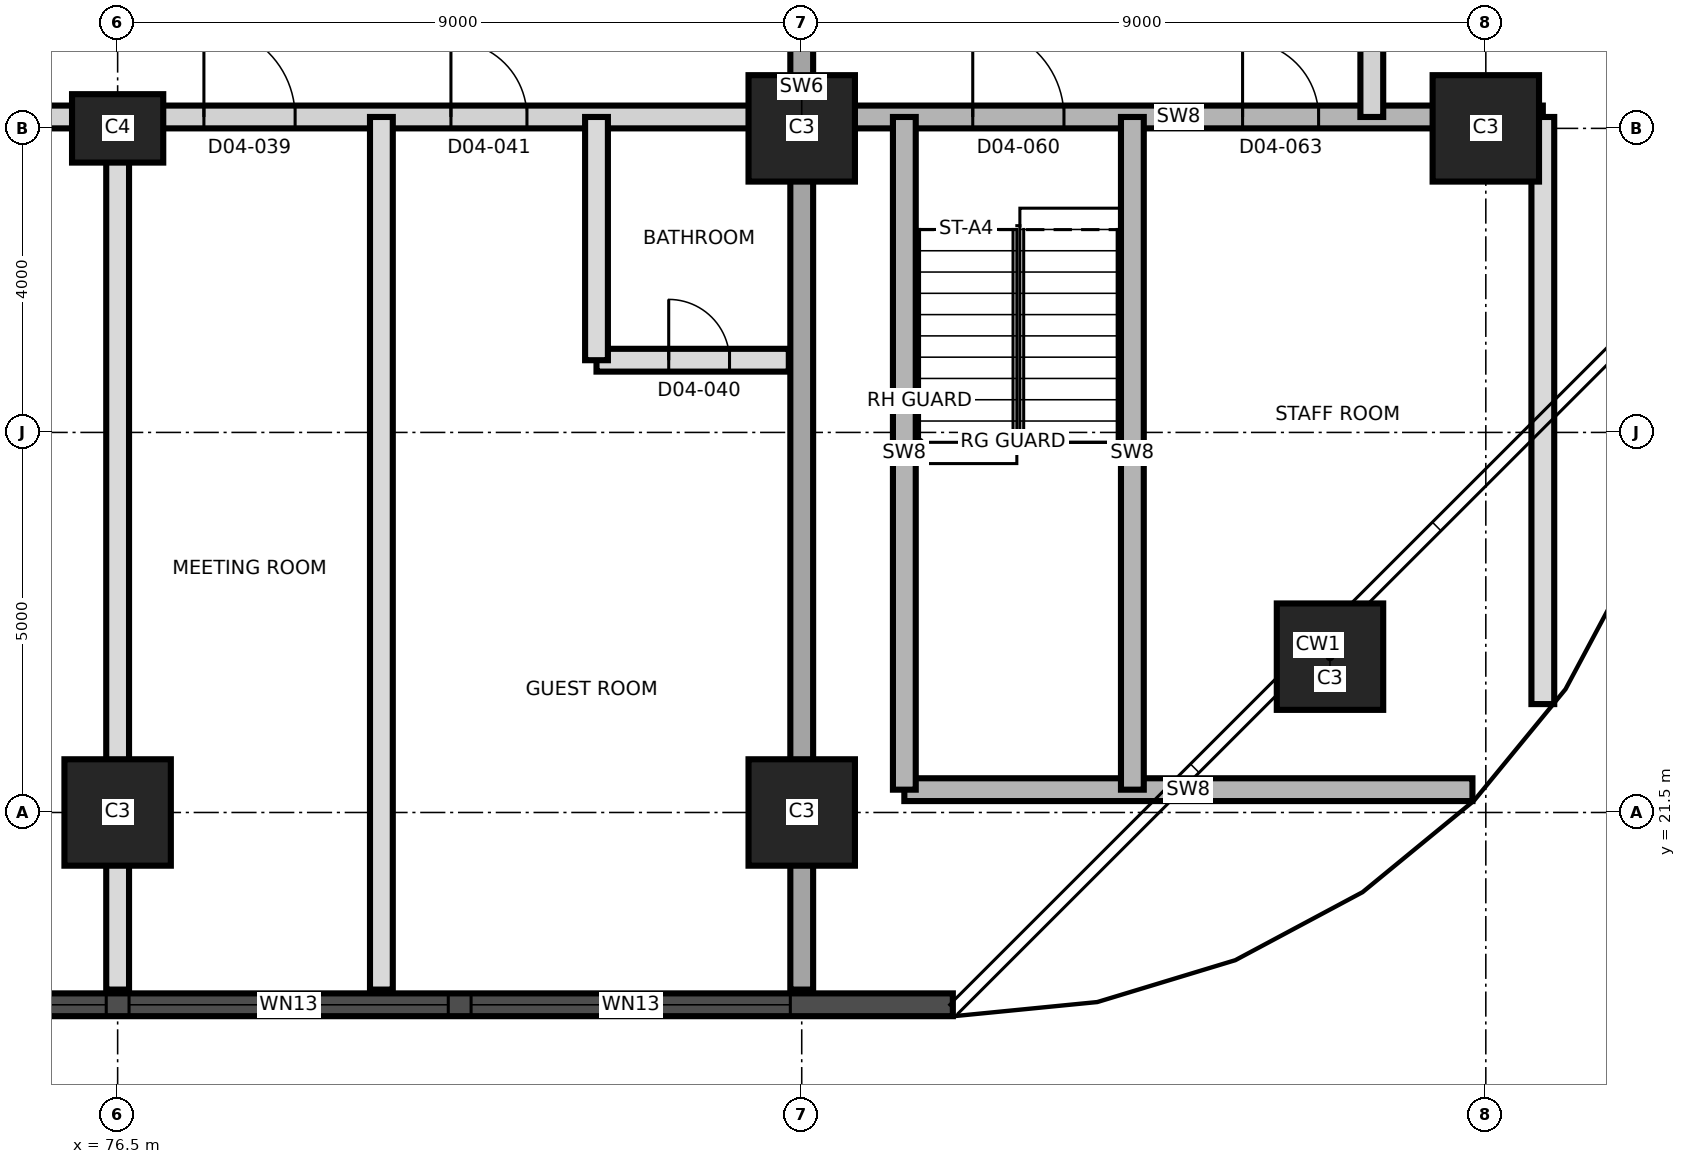
"""IFC4 building model, lengths in metres.
Left out: names, types, materials, properties, quantities, classifications, styles, units other than length and angle.
Written with IfcOpenShell. Run it as: python <this file> out.ifc"""

import sys

from ifc_helpers import new_model, si_unit, direction, frame, frame_2d, origin, origin_2d, place, context, subcontext, project, spatial, rectangle, extrude, element, fill, save


model = new_model("IFC4")
c1 = context("Model", 3, precision=1e-05, world=origin(), true_north=direction((0.0, 1.0)))
c2 = subcontext(c1, "Body", "Model", "MODEL_VIEW")
j1 = project(units=[si_unit("LENGTHUNIT", "METRE"), si_unit("PLANEANGLEUNIT", "RADIAN")], contexts=[c1])
p1 = place(None, origin())
s1 = spatial("IfcSite", under=j1, at=p1, CompositionType="ELEMENT")
p2 = place(p1, origin())
s2 = spatial("IfcBuilding", under=s1, at=p2, CompositionType="ELEMENT")
p3 = place(p2, frame((0.0, 0.0, 66.8)))
s3 = spatial("IfcBuildingStorey", under=s2, at=p3, CompositionType="ELEMENT", Elevation=66.8)
for number, where, z_axis, x_axis in (
    (1, (76.5, 21.5, 0.0), (0.0, 0.0, 1.0), (1.0, 0.0, 0.0)),
    (2, (85.5, 21.5, 0.0), (0.0, 0.0, 1.0), (1.0, 0.0, 0.0)),
    (3, (92.45, 23.55, 0.0), (0.0, 0.0, 1.0), (1.0, 0.0, 0.0)),
):
    element("IfcColumn", number, at=place(p3, frame(where, z_axis=z_axis, x_axis=x_axis)), inside=s3, PredefinedType="COLUMN", context=c2, shape_type="SweptSolid", body=[
        extrude(rectangle(XDim=1.4, YDim=1.4, at=origin_2d()), origin(), (0.0, 0.0, 1.0), 3.7),
    ])
p4 = place(p3, frame((76.5, 30.5, 0.0), z_axis=(0.0, 0.0, 1.0), x_axis=(1.0, 0.0, 0.0)))
e4 = element("IfcColumn", 4, at=p4, inside=s3, PredefinedType="COLUMN", context=c2, shape_type="SweptSolid", body=[
    extrude(rectangle(XDim=1.2, YDim=0.9, at=origin_2d()), origin(), (0.0, 0.0, 1.0), 3.7),
])
for number, where, z_axis, x_axis in (
    (5, (85.5, 30.5, 0.0), (0.0, 0.0, 1.0), (1.0, 0.0, 0.0)),
    (6, (94.5, 30.5, 0.0), (0.0, 0.0, 1.0), (1.0, 0.0, 0.0)),
):
    element("IfcColumn", number, at=place(p3, frame(where, z_axis=z_axis, x_axis=x_axis)), inside=s3, PredefinedType="COLUMN", context=c2, shape_type="SweptSolid", body=[
        extrude(rectangle(XDim=1.4, YDim=1.4, at=origin_2d()), origin(), (0.0, 0.0, 1.0), 3.7),
    ])
p5 = place(p3, frame((85.5, 19.17, 0.0), z_axis=(0.0, 0.0, 1.0), x_axis=(0.0, 1.0, 0.0)))
e7 = element("IfcWall", 7, at=p5, inside=s3, PredefinedType="SHEAR", context=c2, shape_type="SweptSolid", body=[
    extrude(rectangle(XDim=22.66, YDim=0.3, at=frame_2d((11.33, 0.0))), origin(), (0.0, 0.0, 1.0), 3.7),
])
p6 = place(p5, frame((12.53, 0.0, 0.0)))
e8 = element("IfcOpeningElement", 8, at=p6, cuts=e7, PredefinedType="OPENING", context=c2, shape_type="SweptSolid", body=[
    extrude(rectangle(XDim=1.4, YDim=2.1, at=frame_2d((0.7, 1.05))), frame((0.0, 0.16, 0.0), z_axis=(0.0, -1.0, 0.0), x_axis=(1.0, 0.0, 0.0)), (0.0, 0.0, 1.0), 0.32),
])
p7 = place(p3, frame((44.01, 18.97, 0.0), z_axis=(0.0, 0.0, 1.0), x_axis=(1.0, 0.0, 0.0)))
e9 = element("IfcWall", 9, at=p7, inside=s3, PredefinedType="SOLIDWALL", context=c2, shape_type="SweptSolid", body=[
    extrude(rectangle(XDim=43.478, YDim=0.3, at=frame_2d((21.739, 0.0))), origin(), (0.0, 0.0, 1.0), 3.4),
])
p8 = place(p7, frame((1.845, 0.0, 0.3)))
e10 = element("IfcOpeningElement", 10, at=p8, cuts=e9, PredefinedType="OPENING", context=c2, shape_type="SweptSolid", body=[
    extrude(rectangle(XDim=1.8, YDim=2.4, at=frame_2d((0.9, 1.2))), frame((0.0, 0.16, 0.0), z_axis=(0.0, -1.0, 0.0), x_axis=(1.0, 0.0, 0.0)), (0.0, 0.0, 1.0), 0.32),
])
p9 = place(p7, frame((5.64, 0.0, 0.9)))
e11 = element("IfcOpeningElement", 11, at=p9, cuts=e9, PredefinedType="OPENING", context=c2, shape_type="SweptSolid", body=[
    extrude(rectangle(XDim=4.2, YDim=1.7, at=frame_2d((2.1, 0.85))), frame((0.0, 0.16, 0.0), z_axis=(0.0, -1.0, 0.0), x_axis=(1.0, 0.0, 0.0)), (0.0, 0.0, 1.0), 0.32),
])
p10 = place(p7, frame((10.14, 0.0, 0.9)))
e12 = element("IfcOpeningElement", 12, at=p10, cuts=e9, PredefinedType="OPENING", context=c2, shape_type="SweptSolid", body=[
    extrude(rectangle(XDim=4.2, YDim=1.7, at=frame_2d((2.1, 0.85))), frame((0.0, 0.16, 0.0), z_axis=(0.0, -1.0, 0.0), x_axis=(1.0, 0.0, 0.0)), (0.0, 0.0, 1.0), 0.32),
])
p11 = place(p7, frame((14.64, 0.0, 0.9)))
e13 = element("IfcOpeningElement", 13, at=p11, cuts=e9, PredefinedType="OPENING", context=c2, shape_type="SweptSolid", body=[
    extrude(rectangle(XDim=4.2, YDim=1.7, at=frame_2d((2.1, 0.85))), frame((0.0, 0.16, 0.0), z_axis=(0.0, -1.0, 0.0), x_axis=(1.0, 0.0, 0.0)), (0.0, 0.0, 1.0), 0.32),
])
p12 = place(p7, frame((19.14, 0.0, 0.9)))
e14 = element("IfcOpeningElement", 14, at=p12, cuts=e9, PredefinedType="OPENING", context=c2, shape_type="SweptSolid", body=[
    extrude(rectangle(XDim=4.2, YDim=1.7, at=frame_2d((2.1, 0.85))), frame((0.0, 0.16, 0.0), z_axis=(0.0, -1.0, 0.0), x_axis=(1.0, 0.0, 0.0)), (0.0, 0.0, 1.0), 0.32),
])
p13 = place(p7, frame((23.64, 0.0, 0.9)))
e15 = element("IfcOpeningElement", 15, at=p13, cuts=e9, PredefinedType="OPENING", context=c2, shape_type="SweptSolid", body=[
    extrude(rectangle(XDim=4.2, YDim=1.7, at=frame_2d((2.1, 0.85))), frame((0.0, 0.16, 0.0), z_axis=(0.0, -1.0, 0.0), x_axis=(1.0, 0.0, 0.0)), (0.0, 0.0, 1.0), 0.32),
])
p14 = place(p7, frame((28.14, 0.0, 0.9)))
e16 = element("IfcOpeningElement", 16, at=p14, cuts=e9, PredefinedType="OPENING", context=c2, shape_type="SweptSolid", body=[
    extrude(rectangle(XDim=4.2, YDim=1.7, at=frame_2d((2.1, 0.85))), frame((0.0, 0.16, 0.0), z_axis=(0.0, -1.0, 0.0), x_axis=(1.0, 0.0, 0.0)), (0.0, 0.0, 1.0), 0.32),
])
p15 = place(p7, frame((32.64, 0.0, 0.9)))
e17 = element("IfcOpeningElement", 17, at=p15, cuts=e9, PredefinedType="OPENING", context=c2, shape_type="SweptSolid", body=[
    extrude(rectangle(XDim=4.2, YDim=1.7, at=frame_2d((2.1, 0.85))), frame((0.0, 0.16, 0.0), z_axis=(0.0, -1.0, 0.0), x_axis=(1.0, 0.0, 0.0)), (0.0, 0.0, 1.0), 0.32),
])
p16 = place(p7, frame((37.14, 0.0, 0.9)))
e18 = element("IfcOpeningElement", 18, at=p16, cuts=e9, PredefinedType="OPENING", context=c2, shape_type="SweptSolid", body=[
    extrude(rectangle(XDim=4.2, YDim=1.7, at=frame_2d((2.1, 0.85))), frame((0.0, 0.16, 0.0), z_axis=(0.0, -1.0, 0.0), x_axis=(1.0, 0.0, 0.0)), (0.0, 0.0, 1.0), 0.32),
])
p17 = place(p3, frame((86.85, 21.8, 0.0), z_axis=(0.0, 0.0, 1.0), x_axis=(1.0, 0.0, 0.0)))
e19 = element("IfcWall", 19, at=p17, inside=s3, PredefinedType="SHEAR", context=c2, shape_type="SweptSolid", body=[
    extrude(rectangle(XDim=7.474, YDim=0.3, at=frame_2d((3.737, 0.0))), origin(), (0.0, 0.0, 1.0), 3.4),
])
p18 = place(p3, frame((82.8, 27.45, 0.0), z_axis=(0.0, 0.0, 1.0), x_axis=(1.0, 0.0, 0.0)))
e20 = element("IfcWall", 20, at=p18, inside=s3, PredefinedType="PARTITIONING", context=c2, shape_type="SweptSolid", body=[
    extrude(rectangle(XDim=2.53, YDim=0.3, at=frame_2d((1.265, 0.0))), origin(), (0.0, 0.0, 1.0), 3.4),
])
p19 = place(p18, frame((0.95, 0.0, 0.0)))
e21 = element("IfcOpeningElement", 21, at=p19, cuts=e20, PredefinedType="OPENING", context=c2, shape_type="SweptSolid", body=[
    extrude(rectangle(XDim=0.8, YDim=2.1, at=frame_2d((0.4, 1.05))), frame((0.0, 0.16, 0.0), z_axis=(0.0, -1.0, 0.0), x_axis=(1.0, 0.0, 0.0)), (0.0, 0.0, 1.0), 0.32),
])
p20 = place(p3, frame((58.95, 30.65, 0.0), z_axis=(0.0, 0.0, 1.0), x_axis=(1.0, 0.0, 0.0)))
e22 = element("IfcWall", 22, at=p20, inside=s3, PredefinedType="PARTITIONING", context=c2, shape_type="SweptSolid", body=[
    extrude(rectangle(XDim=26.38, YDim=0.3, at=frame_2d((13.19, 0.0))), origin(), (0.0, 0.0, 1.0), 3.4),
])
p21 = place(p20, frame((1.25, 0.0, 0.0)))
e23 = element("IfcOpeningElement", 23, at=p21, cuts=e22, PredefinedType="OPENING", context=c2, shape_type="SweptSolid", body=[
    extrude(rectangle(XDim=1.2, YDim=2.1, at=frame_2d((0.6, 1.05))), frame((0.0, 0.16, 0.0), z_axis=(0.0, -1.0, 0.0), x_axis=(1.0, 0.0, 0.0)), (0.0, 0.0, 1.0), 0.32),
])
p22 = place(p20, frame((4.5, 0.0, 0.0)))
e24 = element("IfcOpeningElement", 24, at=p22, cuts=e22, PredefinedType="OPENING", context=c2, shape_type="SweptSolid", body=[
    extrude(rectangle(XDim=1.0, YDim=2.1, at=frame_2d((0.5, 1.05))), frame((0.0, 0.16, 0.0), z_axis=(0.0, -1.0, 0.0), x_axis=(1.0, 0.0, 0.0)), (0.0, 0.0, 1.0), 0.32),
])
p23 = place(p20, frame((14.2, 0.0, 0.0)))
e25 = element("IfcOpeningElement", 25, at=p23, cuts=e22, PredefinedType="OPENING", context=c2, shape_type="SweptSolid", body=[
    extrude(rectangle(XDim=1.0, YDim=2.4, at=frame_2d((0.5, 1.2))), frame((0.0, 0.16, 0.0), z_axis=(0.0, -1.0, 0.0), x_axis=(1.0, 0.0, 0.0)), (0.0, 0.0, 1.0), 0.32),
])
p24 = place(p20, frame((18.685, 0.0, 0.0)))
e26 = element("IfcOpeningElement", 26, at=p24, cuts=e22, PredefinedType="OPENING", context=c2, shape_type="SweptSolid", body=[
    extrude(rectangle(XDim=1.2, YDim=2.1, at=frame_2d((0.6, 1.05))), frame((0.0, 0.16, 0.0), z_axis=(0.0, -1.0, 0.0), x_axis=(1.0, 0.0, 0.0)), (0.0, 0.0, 1.0), 0.32),
])
p25 = place(p20, frame((21.935, 0.0, 0.0)))
e27 = element("IfcOpeningElement", 27, at=p25, cuts=e22, PredefinedType="OPENING", context=c2, shape_type="SweptSolid", body=[
    extrude(rectangle(XDim=1.0, YDim=2.1, at=frame_2d((0.5, 1.05))), frame((0.0, 0.16, 0.0), z_axis=(0.0, -1.0, 0.0), x_axis=(1.0, 0.0, 0.0)), (0.0, 0.0, 1.0), 0.32),
])
p26 = place(p3, frame((85.67, 30.65, 0.0), z_axis=(0.0, 0.0, 1.0), x_axis=(1.0, 0.0, 0.0)))
e28 = element("IfcWall", 28, at=p26, inside=s3, PredefinedType="SHEAR", context=c2, shape_type="SweptSolid", body=[
    extrude(rectangle(XDim=9.58, YDim=0.3, at=frame_2d((4.79, 0.0))), origin(), (0.0, 0.0, 1.0), 3.4),
])
p27 = place(p26, frame((2.08, 0.0, 0.0)))
e29 = element("IfcOpeningElement", 29, at=p27, cuts=e28, PredefinedType="OPENING", context=c2, shape_type="SweptSolid", body=[
    extrude(rectangle(XDim=1.2, YDim=2.1, at=frame_2d((0.6, 1.05))), frame((0.0, 0.16, 0.0), z_axis=(0.0, -1.0, 0.0), x_axis=(1.0, 0.0, 0.0)), (0.0, 0.0, 1.0), 0.32),
])
p28 = place(p26, frame((5.63, 0.0, 0.0)))
e30 = element("IfcOpeningElement", 30, at=p28, cuts=e28, PredefinedType="OPENING", context=c2, shape_type="SweptSolid", body=[
    extrude(rectangle(XDim=1.0, YDim=2.1, at=frame_2d((0.5, 1.05))), frame((0.0, 0.16, 0.0), z_axis=(0.0, -1.0, 0.0), x_axis=(1.0, 0.0, 0.0)), (0.0, 0.0, 1.0), 0.32),
])
for number, where, z_axis, x_axis in (
    (31, (76.5, 19.17, 0.0), (0.0, 0.0, 1.0), (0.0, 1.0, 0.0)),
    (32, (79.97, 19.17, 0.0), (0.0, 0.0, 1.0), (0.0, 1.0, 0.0)),
):
    element("IfcWall", number, at=place(p3, frame(where, z_axis=z_axis, x_axis=x_axis)), inside=s3, PredefinedType="PARTITIONING", context=c2, shape_type="SweptSolid", body=[
        extrude(rectangle(XDim=11.48, YDim=0.3, at=frame_2d((5.74, 0.0))), origin(), (0.0, 0.0, 1.0), 3.35),
    ])
p29 = place(p3, frame((82.8, 27.45, 0.0), z_axis=(0.0, 0.0, 1.0), x_axis=(0.0, 1.0, 0.0)))
e33 = element("IfcWall", 33, at=p29, inside=s3, PredefinedType="PARTITIONING", context=c2, shape_type="SweptSolid", body=[
    extrude(rectangle(XDim=3.2, YDim=0.3, at=frame_2d((1.6, 0.0))), origin(), (0.0, 0.0, 1.0), 3.4),
])
for number, where, z_axis, x_axis in (
    (34, (86.85, 21.8, 0.0), (0.0, 0.0, 1.0), (0.0, 1.0, 0.0)),
    (35, (89.85, 21.8, 0.0), (0.0, 0.0, 1.0), (0.0, 1.0, 0.0)),
):
    element("IfcWall", number, at=place(p3, frame(where, z_axis=z_axis, x_axis=x_axis)), inside=s3, PredefinedType="SHEAR", context=c2, shape_type="SweptSolid", body=[
        extrude(rectangle(XDim=8.85, YDim=0.3, at=frame_2d((4.425, 0.0))), origin(), (0.0, 0.0, 1.0), 3.4),
    ])
p30 = place(p3, frame((93.0, 30.65, 0.0), z_axis=(0.0, 0.0, 1.0), x_axis=(0.0, 1.0, 0.0)))
e36 = element("IfcWall", 36, at=p30, inside=s3, PredefinedType="PARTITIONING", context=c2, shape_type="SweptSolid", body=[
    extrude(rectangle(XDim=2.7, YDim=0.3, at=frame_2d((1.35, 0.0))), origin(), (0.0, 0.0, 1.0), 3.4),
])
p31 = place(p3, frame((95.25, 22.926, 0.0), z_axis=(0.0, 0.0, 1.0), x_axis=(0.0, 1.0, 0.0)))
e37 = element("IfcWall", 37, at=p31, inside=s3, PredefinedType="PARTITIONING", context=c2, shape_type="SweptSolid", body=[
    extrude(rectangle(XDim=7.724, YDim=0.3, at=frame_2d((3.862, 0.0))), origin(), (0.0, 0.0, 1.0), 3.35),
])
p32 = place(p14, origin())
e38 = element("IfcWindow", 38, at=p32, inside=s3, PartitioningType="SINGLE_PANEL", PredefinedType="WINDOW", context=c2, shape_type="SweptSolid", body=[
    extrude(rectangle(XDim=4.2, YDim=1.7, at=frame_2d((2.1, 0.85))), frame((0.0, 0.03, 0.0), z_axis=(0.0, -1.0, 0.0), x_axis=(1.0, 0.0, 0.0)), (0.0, 0.0, 1.0), 0.06),
])
fill(e16, e38)
p33 = place(p15, origin())
e39 = element("IfcWindow", 39, at=p33, inside=s3, PartitioningType="SINGLE_PANEL", PredefinedType="WINDOW", context=c2, shape_type="SweptSolid", body=[
    extrude(rectangle(XDim=4.2, YDim=1.7, at=frame_2d((2.1, 0.85))), frame((0.0, 0.03, 0.0), z_axis=(0.0, -1.0, 0.0), x_axis=(1.0, 0.0, 0.0)), (0.0, 0.0, 1.0), 0.06),
])
fill(e17, e39)
p34 = place(p16, origin())
e40 = element("IfcWindow", 40, at=p34, inside=s3, PartitioningType="SINGLE_PANEL", PredefinedType="WINDOW", context=c2, shape_type="SweptSolid", body=[
    extrude(rectangle(XDim=4.2, YDim=1.7, at=frame_2d((2.1, 0.85))), frame((0.0, 0.03, 0.0), z_axis=(0.0, -1.0, 0.0), x_axis=(1.0, 0.0, 0.0)), (0.0, 0.0, 1.0), 0.06),
])
fill(e18, e40)
p35 = place(p24, origin())
e41 = element("IfcDoor", 41, at=p35, inside=s3, OperationType="SINGLE_SWING_LEFT", PredefinedType="DOOR", context=c2, shape_type="SweptSolid", body=[
    extrude(rectangle(XDim=1.2, YDim=2.1, at=frame_2d((0.6, 1.05))), frame((0.0, 0.025, 0.0), z_axis=(0.0, -1.0, 0.0), x_axis=(1.0, 0.0, 0.0)), (0.0, 0.0, 1.0), 0.05),
])
fill(e26, e41)
p36 = place(p19, origin())
e42 = element("IfcDoor", 42, at=p36, inside=s3, OperationType="SINGLE_SWING_LEFT", PredefinedType="DOOR", context=c2, shape_type="SweptSolid", body=[
    extrude(rectangle(XDim=0.8, YDim=2.1, at=frame_2d((0.4, 1.05))), frame((0.0, 0.025, 0.0), z_axis=(0.0, -1.0, 0.0), x_axis=(1.0, 0.0, 0.0)), (0.0, 0.0, 1.0), 0.05),
])
fill(e21, e42)
p37 = place(p25, origin())
e43 = element("IfcDoor", 43, at=p37, inside=s3, OperationType="SINGLE_SWING_RIGHT", PredefinedType="DOOR", context=c2, shape_type="SweptSolid", body=[
    extrude(rectangle(XDim=1.0, YDim=2.1, at=frame_2d((0.5, 1.05))), frame((0.0, 0.025, 0.0), z_axis=(0.0, -1.0, 0.0), x_axis=(1.0, 0.0, 0.0)), (0.0, 0.0, 1.0), 0.05),
])
fill(e27, e43)
p38 = place(p27, origin())
e44 = element("IfcDoor", 44, at=p38, inside=s3, OperationType="SINGLE_SWING_LEFT", PredefinedType="DOOR", context=c2, shape_type="SweptSolid", body=[
    extrude(rectangle(XDim=1.2, YDim=2.1, at=frame_2d((0.6, 1.05))), frame((0.0, 0.025, 0.0), z_axis=(0.0, -1.0, 0.0), x_axis=(1.0, 0.0, 0.0)), (0.0, 0.0, 1.0), 0.05),
])
fill(e29, e44)
p39 = place(p28, origin())
e45 = element("IfcDoor", 45, at=p39, inside=s3, OperationType="SINGLE_SWING_LEFT", PredefinedType="DOOR", context=c2, shape_type="SweptSolid", body=[
    extrude(rectangle(XDim=1.0, YDim=2.1, at=frame_2d((0.5, 1.05))), frame((0.0, 0.025, 0.0), z_axis=(0.0, -1.0, 0.0), x_axis=(1.0, 0.0, 0.0)), (0.0, 0.0, 1.0), 0.05),
])
fill(e30, e45)
save(model, sys.argv[1])
